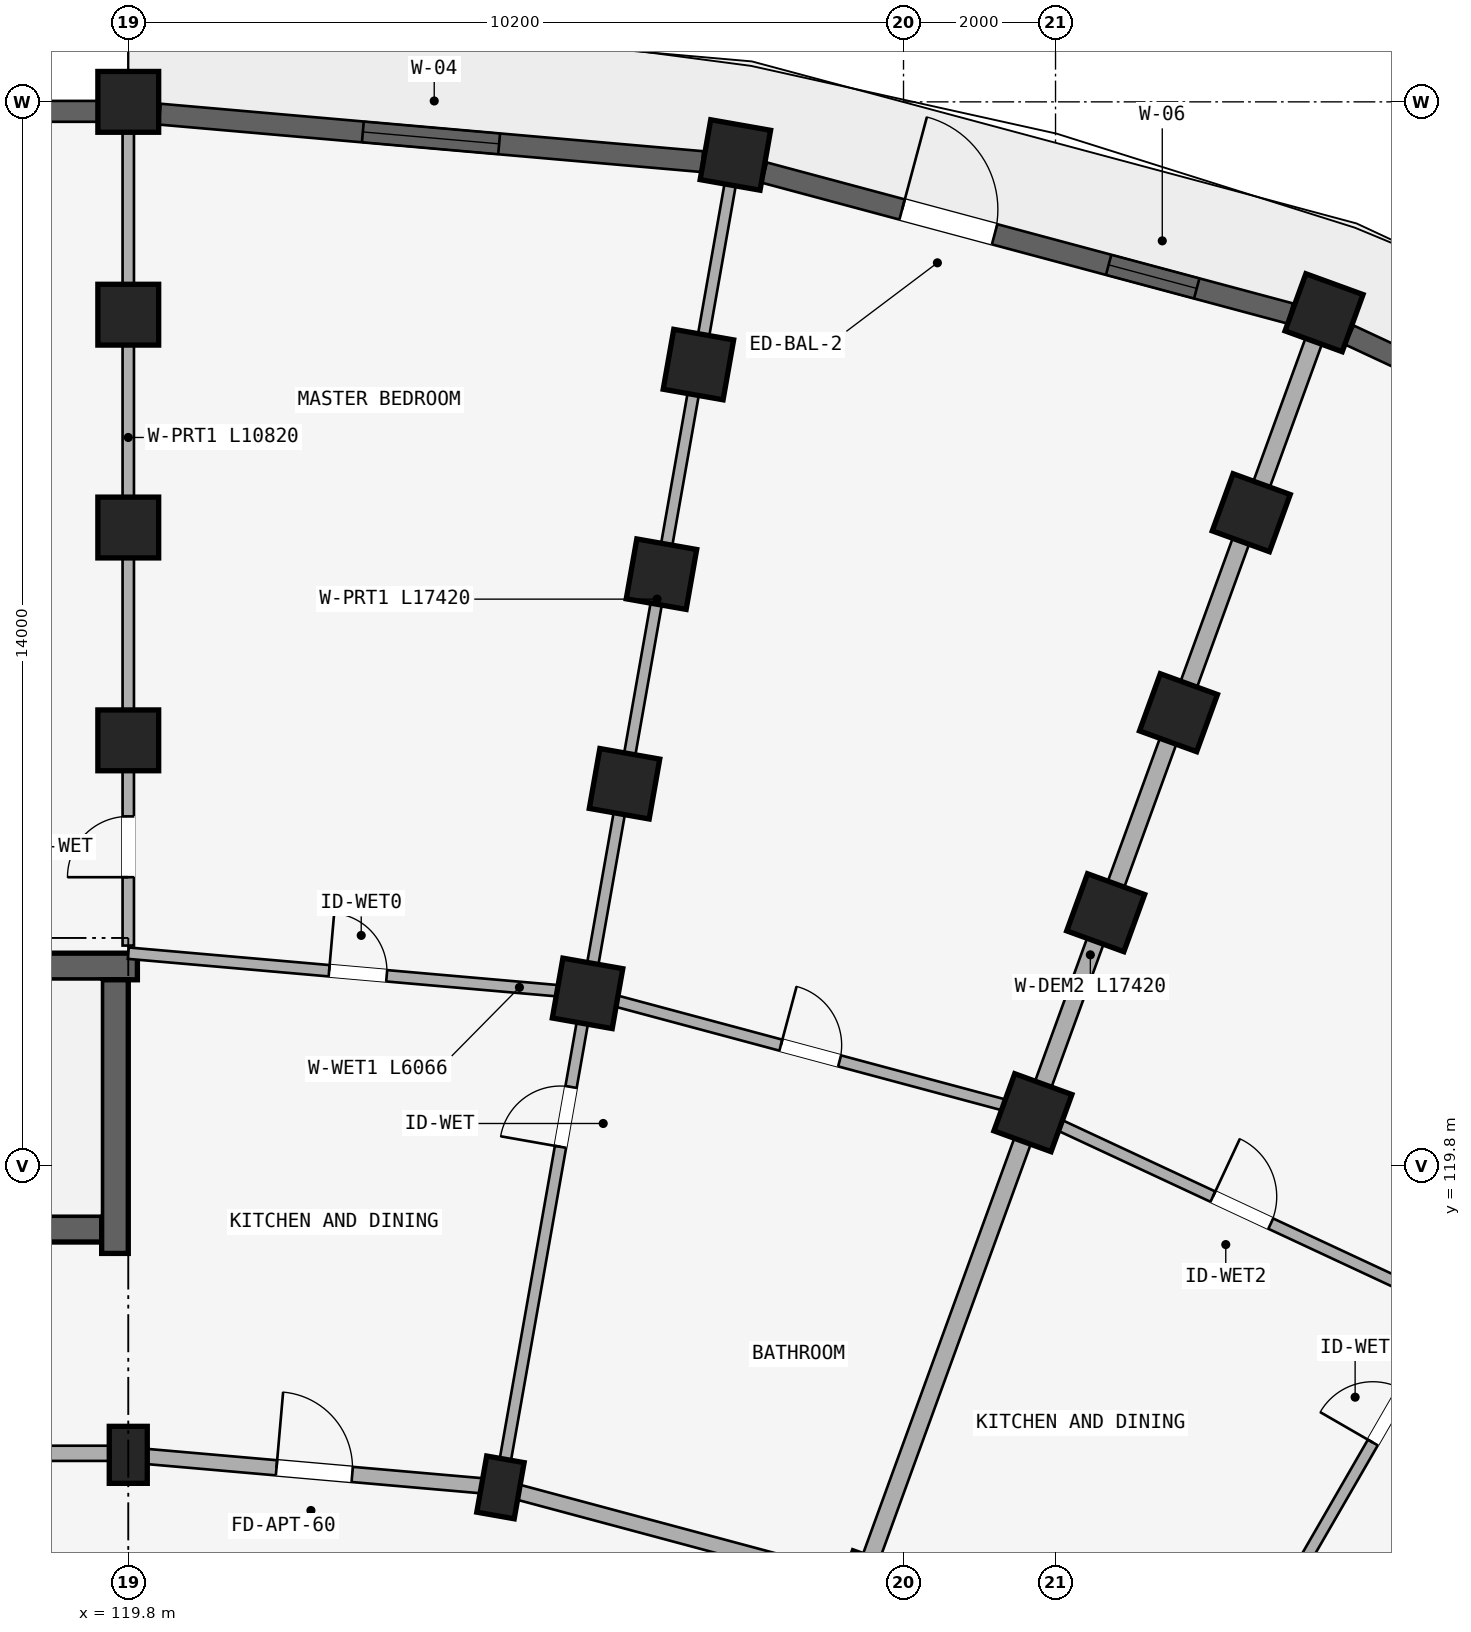
"""IFC4 building model, lengths in metres.
Left out: names, types, materials, properties, quantities, classifications, styles, units other than length and angle.
Written with IfcOpenShell. Run it as: python <this file> out.ifc"""

import sys

from ifc_helpers import new_model, si_unit, direction, frame, frame_2d, origin, origin_2d, place, context, subcontext, project, spatial, rectangle, extrude, element, fill, save


model = new_model("IFC4")
c1 = context("Model", 3, precision=1e-05, world=origin(), true_north=direction((0.0, 1.0)))
c2 = subcontext(c1, "Body", "Model", "MODEL_VIEW")
j1 = project(units=[si_unit("LENGTHUNIT", "METRE"), si_unit("PLANEANGLEUNIT", "RADIAN")], contexts=[c1])
p1 = place(None, origin())
s1 = spatial("IfcSite", under=j1, at=p1, CompositionType="ELEMENT")
p2 = place(p1, origin())
s2 = spatial("IfcBuilding", under=s1, at=p2, CompositionType="ELEMENT")
p3 = place(p2, frame((0.0, 0.0, 8.7)))
s3 = spatial("IfcBuildingStorey", under=s2, at=p3, CompositionType="ELEMENT", Elevation=8.7)
p4 = place(p3, frame((119.92, 122.425, 0.0), z_axis=(0.0, 0.0, 1.0), x_axis=(-1.0, 0.0, 0.0)))
e1 = element("IfcWall", 1, at=p4, inside=s3, PredefinedType="SHEAR", context=c2, shape_type="SweptSolid", body=[
    extrude(rectangle(XDim=8.545, YDim=0.35, at=frame_2d((4.272, 0.0))), origin(), (0.0, 0.0, 1.0), 2.93),
])
p5 = place(p3, frame((119.45, 118.975, 0.0), z_axis=(0.0, 0.0, 1.0), x_axis=(-1.0, 0.0, 0.0)))
e2 = element("IfcWall", 2, at=p5, inside=s3, PredefinedType="SHEAR", context=c2, shape_type="SweptSolid", body=[
    extrude(rectangle(XDim=8.075, YDim=0.35, at=frame_2d((4.038, 0.0))), origin(), (0.0, 0.0, 1.0), 2.93),
])
p6 = place(p5, frame((6.38, 0.0, 0.0)))
e3 = element("IfcOpeningElement", 3, at=p6, cuts=e2, PredefinedType="OPENING", context=c2, shape_type="SweptSolid", body=[
    extrude(rectangle(XDim=1.24, YDim=2.15, at=frame_2d((0.62, 1.075))), frame((0.0, 0.185, 0.0), z_axis=(0.0, -1.0, 0.0), x_axis=(1.0, 0.0, 0.0)), (0.0, 0.0, 1.0), 0.37),
])
p7 = place(p3, frame((119.625, 118.65, 0.0), z_axis=(0.0, 0.0, 1.0), x_axis=(0.0, 1.0, 0.0)))
e4 = element("IfcWall", 4, at=p7, inside=s3, PredefinedType="SHEAR", context=c2, shape_type="SweptSolid", body=[
    extrude(rectangle(XDim=3.6, YDim=0.35, at=frame_2d((1.8, 0.0))), origin(), (0.0, 0.0, 1.0), 2.93),
])
p8 = place(p3, frame((119.8, 116.0, 0.0), z_axis=(0.0, 0.0, 1.0), x_axis=(1.0, 0.0, 0.0)))
e5 = element("IfcColumn", 5, at=p8, inside=s3, PredefinedType="COLUMN", context=c2, shape_type="SweptSolid", body=[
    extrude(rectangle(XDim=0.5, YDim=0.75, at=origin_2d()), origin(), (0.0, 0.0, 1.0), 2.93),
])
for number, where, z_axis, x_axis in (
    (6, (119.8, 125.4, 0.0), (0.0, 0.0, 1.0), (1.0, 0.0, 0.0)),
    (7, (119.8, 128.2, 0.0), (0.0, 0.0, 1.0), (1.0, 0.0, 0.0)),
    (8, (119.8, 131.0, 0.0), (0.0, 0.0, 1.0), (1.0, 0.0, 0.0)),
    (9, (119.8, 133.8, 0.0), (0.0, 0.0, 1.0), (1.0, 0.0, 0.0)),
):
    element("IfcColumn", number, at=place(p3, frame(where, z_axis=z_axis, x_axis=x_axis)), inside=s3, PredefinedType="COLUMN", context=c2, shape_type="SweptSolid", body=[
        extrude(rectangle(XDim=0.8, YDim=0.8, at=origin_2d()), origin(), (0.0, 0.0, 1.0), 2.93),
    ])
p9 = place(p3, frame((124.697, 115.572, 0.0), z_axis=(0.0, 0.0, 1.0), x_axis=(-0.984807753012, 0.173648177667, 0.0)))
e10 = element("IfcColumn", 10, at=p9, inside=s3, PredefinedType="COLUMN", context=c2, shape_type="SweptSolid", body=[
    extrude(rectangle(XDim=0.5, YDim=0.75, at=origin_2d()), origin(), (0.0, 0.0, 1.0), 2.93),
])
for number, where, z_axis, x_axis in (
    (11, (125.843, 122.071, 0.0), (0.0, 0.0, 1.0), (-0.985, 0.174, 0.0)),
    (12, (126.329, 124.829, 0.0), (0.0, 0.0, 1.0), (-0.985, 0.174, 0.0)),
    (13, (126.815, 127.586, 0.0), (0.0, 0.0, 1.0), (-0.985, 0.174, 0.0)),
    (14, (127.302, 130.344, 0.0), (0.0, 0.0, 1.0), (-0.985, 0.174, 0.0)),
    (15, (127.788, 133.101, 0.0), (0.0, 0.0, 1.0), (-0.985, 0.174, 0.0)),
):
    element("IfcColumn", number, at=place(p3, frame(where, z_axis=z_axis, x_axis=x_axis)), inside=s3, PredefinedType="COLUMN", context=c2, shape_type="SweptSolid", body=[
        extrude(rectangle(XDim=0.8, YDim=0.8, at=origin_2d()), origin(), (0.0, 0.0, 1.0), 2.93),
    ])
p10 = place(p3, frame((129.445, 114.299, 0.0), z_axis=(0.0, 0.0, 1.0), x_axis=(-0.939692620786, 0.342020143326, 0.0)))
e16 = element("IfcColumn", 16, at=p10, inside=s3, PredefinedType="COLUMN", context=c2, shape_type="SweptSolid", body=[
    extrude(rectangle(XDim=0.5, YDim=0.75, at=origin_2d()), origin(), (0.0, 0.0, 1.0), 2.93),
])
for number, where, z_axis, x_axis in (
    (17, (131.702, 120.501, 0.0), (0.0, 0.0, 1.0), (-0.94, 0.342, 0.0)),
    (18, (132.66, 123.132, 0.0), (0.0, 0.0, 1.0), (-0.94, 0.342, 0.0)),
    (19, (133.618, 125.764, 0.0), (0.0, 0.0, 1.0), (-0.94, 0.342, 0.0)),
    (20, (134.575, 128.395, 0.0), (0.0, 0.0, 1.0), (-0.94, 0.342, 0.0)),
    (21, (135.533, 131.026, 0.0), (0.0, 0.0, 1.0), (-0.94, 0.342, 0.0)),
):
    element("IfcColumn", number, at=place(p3, frame(where, z_axis=z_axis, x_axis=x_axis)), inside=s3, PredefinedType="COLUMN", context=c2, shape_type="SweptSolid", body=[
        extrude(rectangle(XDim=0.8, YDim=0.8, at=origin_2d()), origin(), (0.0, 0.0, 1.0), 2.93),
    ])
p11 = place(p3, frame((119.55, 116.02, 0.0), z_axis=(0.0, 0.0, 1.0), x_axis=(-1.0, 0.0, 0.0)))
e22 = element("IfcWall", 22, at=p11, inside=s3, PredefinedType="STANDARD", context=c2, shape_type="SweptSolid", body=[
    extrude(rectangle(XDim=5.25, YDim=0.2, at=frame_2d((2.625, 0.0))), origin(), (0.0, 0.0, 1.0), 2.372),
])
p12 = place(p11, frame((2.165, 0.0, 0.0)))
e23 = element("IfcOpeningElement", 23, at=p12, cuts=e22, PredefinedType="OPENING", context=c2, shape_type="SweptSolid", body=[
    extrude(rectangle(XDim=0.92, YDim=2.1, at=frame_2d((0.46, 1.05))), frame((0.0, 0.11, 0.0), z_axis=(0.0, -1.0, 0.0), x_axis=(1.0, 0.0, 0.0)), (0.0, 0.0, 1.0), 0.22),
])
p13 = place(p3, frame((119.8, 116.0, 0.0), z_axis=(0.0, 0.0, 1.0), x_axis=(0.996193663584, -0.087167566415, 0.0)))
e24 = element("IfcWall", 24, at=p13, inside=s3, PredefinedType="STANDARD", context=c2, shape_type="SweptSolid", body=[
    extrude(rectangle(XDim=4.916, YDim=0.2, at=frame_2d((2.458, 0.0))), origin(), (0.0, 0.0, 1.0), 2.372),
])
p14 = place(p13, frame((1.958, 0.0, 0.0)))
e25 = element("IfcOpeningElement", 25, at=p14, cuts=e24, PredefinedType="OPENING", context=c2, shape_type="SweptSolid", body=[
    extrude(rectangle(XDim=1.0, YDim=2.15, at=frame_2d((0.5, 1.075))), frame((0.0, 0.11, 0.0), z_axis=(0.0, -1.0, 0.0), x_axis=(1.0, 0.0, 0.0)), (0.0, 0.0, 1.0), 0.22),
])
p15 = place(p3, frame((124.697, 115.572, 0.0), z_axis=(0.0, 0.0, 1.0), x_axis=(0.965930095386, -0.258803112091, 0.0)))
e26 = element("IfcWall", 26, at=p15, inside=s3, PredefinedType="STANDARD", context=c2, shape_type="SweptSolid", body=[
    extrude(rectangle(XDim=4.916, YDim=0.2, at=frame_2d((2.458, 0.0))), origin(), (0.0, 0.0, 1.0), 2.372),
])
p16 = place(p3, frame((119.8, 122.7, 0.0), z_axis=(0.0, 0.0, 1.0), x_axis=(0.0, 1.0, 0.0)))
e27 = element("IfcWall", 27, at=p16, inside=s3, PredefinedType="PARTITIONING", context=c2, shape_type="SweptSolid", body=[
    extrude(rectangle(XDim=10.82, YDim=0.15, at=frame_2d((5.41, 0.0))), origin(), (0.0, 0.0, 1.0), 2.372),
])
p17 = place(p16, frame((0.899, 0.0, 0.0)))
e28 = element("IfcOpeningElement", 28, at=p17, cuts=e27, PredefinedType="OPENING", context=c2, shape_type="SweptSolid", body=[
    extrude(rectangle(XDim=0.8, YDim=2.1, at=frame_2d((0.4, 1.05))), frame((0.0, 0.085, 0.0), z_axis=(0.0, -1.0, 0.0), x_axis=(1.0, 0.0, 0.0)), (0.0, 0.0, 1.0), 0.17),
])
p18 = place(p3, frame((124.714, 115.67, 0.0), z_axis=(0.0, 0.0, 1.0), x_axis=(0.173646216546, 0.984808098809, 0.0)))
e29 = element("IfcWall", 29, at=p18, inside=s3, PredefinedType="PARTITIONING", context=c2, shape_type="SweptSolid", body=[
    extrude(rectangle(XDim=17.42, YDim=0.15, at=frame_2d((8.71, 0.0))), origin(), (0.0, 0.0, 1.0), 2.372),
])
p19 = place(p18, frame((4.45, 0.0, 0.0)))
e30 = element("IfcOpeningElement", 30, at=p19, cuts=e29, PredefinedType="OPENING", context=c2, shape_type="SweptSolid", body=[
    extrude(rectangle(XDim=0.8, YDim=2.1, at=frame_2d((0.4, 1.05))), frame((0.0, 0.085, 0.0), z_axis=(0.0, -1.0, 0.0), x_axis=(1.0, 0.0, 0.0)), (0.0, 0.0, 1.0), 0.17),
])
p20 = place(p3, frame((129.479, 114.393, 0.0), z_axis=(0.0, 0.0, 1.0), x_axis=(0.342022120477, 0.939691901159, 0.0)))
e31 = element("IfcWall", 31, at=p20, inside=s3, PredefinedType="STANDARD", context=c2, shape_type="SweptSolid", body=[
    extrude(rectangle(XDim=17.42, YDim=0.23, at=frame_2d((8.71, 0.0))), origin(), (0.0, 0.0, 1.0), 2.372),
])
p21 = place(p3, frame((133.95, 112.309, 0.0), z_axis=(0.0, 0.0, 1.0), x_axis=(0.499997843263, 0.866026648973, 0.0)))
e32 = element("IfcWall", 32, at=p21, inside=s3, PredefinedType="PARTITIONING", context=c2, shape_type="SweptSolid", body=[
    extrude(rectangle(XDim=17.42, YDim=0.15, at=frame_2d((8.71, 0.0))), origin(), (0.0, 0.0, 1.0), 2.372),
])
p22 = place(p21, frame((4.45, 0.0, 0.0)))
e33 = element("IfcOpeningElement", 33, at=p22, cuts=e32, PredefinedType="OPENING", context=c2, shape_type="SweptSolid", body=[
    extrude(rectangle(XDim=0.8, YDim=2.1, at=frame_2d((0.4, 1.05))), frame((0.0, 0.085, 0.0), z_axis=(0.0, -1.0, 0.0), x_axis=(1.0, 0.0, 0.0)), (0.0, 0.0, 1.0), 0.17),
])
p23 = place(p3, frame((119.8, 122.6, 0.0), z_axis=(0.0, 0.0, 1.0), x_axis=(0.996193018494, -0.087174938512, 0.0)))
e34 = element("IfcWall", 34, at=p23, inside=s3, PredefinedType="PLUMBINGWALL", context=c2, shape_type="SweptSolid", body=[
    extrude(rectangle(XDim=6.066, YDim=0.15, at=frame_2d((3.033, 0.0))), origin(), (0.0, 0.0, 1.0), 2.372),
])
p24 = place(p23, frame((2.653, 0.0, 0.0)))
e35 = element("IfcOpeningElement", 35, at=p24, cuts=e34, PredefinedType="OPENING", context=c2, shape_type="SweptSolid", body=[
    extrude(rectangle(XDim=0.76, YDim=2.05, at=frame_2d((0.38, 1.025))), frame((0.0, 0.085, 0.0), z_axis=(0.0, -1.0, 0.0), x_axis=(1.0, 0.0, 0.0)), (0.0, 0.0, 1.0), 0.17),
])
p25 = place(p3, frame((125.843, 122.071, 0.0), z_axis=(0.0, 0.0, 1.0), x_axis=(0.965923618901, -0.258827283048, 0.0)))
e36 = element("IfcWall", 36, at=p25, inside=s3, PredefinedType="PLUMBINGWALL", context=c2, shape_type="SweptSolid", body=[
    extrude(rectangle(XDim=6.066, YDim=0.15, at=frame_2d((3.033, 0.0))), origin(), (0.0, 0.0, 1.0), 2.372),
])
p26 = place(p25, frame((2.633, 0.0, 0.0)))
e37 = element("IfcOpeningElement", 37, at=p26, cuts=e36, PredefinedType="OPENING", context=c2, shape_type="SweptSolid", body=[
    extrude(rectangle(XDim=0.8, YDim=2.1, at=frame_2d((0.4, 1.05))), frame((0.0, 0.085, 0.0), z_axis=(0.0, -1.0, 0.0), x_axis=(1.0, 0.0, 0.0)), (0.0, 0.0, 1.0), 0.17),
])
p27 = place(p3, frame((131.702, 120.501, 0.0), z_axis=(0.0, 0.0, 1.0), x_axis=(0.906312656069, -0.42260781991, 0.0)))
e38 = element("IfcWall", 38, at=p27, inside=s3, PredefinedType="PLUMBINGWALL", context=c2, shape_type="SweptSolid", body=[
    extrude(rectangle(XDim=6.066, YDim=0.15, at=frame_2d((3.033, 0.0))), origin(), (0.0, 0.0, 1.0), 2.372),
])
p28 = place(p27, frame((2.613, 0.0, 0.0)))
e39 = element("IfcOpeningElement", 39, at=p28, cuts=e38, PredefinedType="OPENING", context=c2, shape_type="SweptSolid", body=[
    extrude(rectangle(XDim=0.84, YDim=2.1, at=frame_2d((0.42, 1.05))), frame((0.0, 0.085, 0.0), z_axis=(0.0, -1.0, 0.0), x_axis=(1.0, 0.0, 0.0)), (0.0, 0.0, 1.0), 0.17),
])
p29 = place(p3, frame((120.215, 133.638, 0.0), z_axis=(0.0, 0.0, 1.0), x_axis=(0.99619608453, -0.08713989423, 0.0)))
e40 = element("IfcWall", 40, at=p29, inside=s3, PredefinedType="STANDARD", context=c2, shape_type="SweptSolid", body=[
    extrude(rectangle(XDim=7.164, YDim=0.275, at=frame_2d((3.582, 0.0))), origin(), (0.0, 0.0, 1.0), 2.472),
])
p30 = place(p29, frame((2.682, 0.0, 0.622)))
e41 = element("IfcOpeningElement", 41, at=p30, cuts=e40, PredefinedType="OPENING", context=c2, shape_type="SweptSolid", body=[
    extrude(rectangle(XDim=1.8, YDim=1.65, at=frame_2d((0.9, 0.825))), frame((0.0, 0.147, 0.0), z_axis=(0.0, -1.0, 0.0), x_axis=(1.0, 0.0, 0.0)), (0.0, 0.0, 1.0), 0.295),
])
p31 = place(p3, frame((128.168, 132.87, 0.0), z_axis=(0.0, 0.0, 1.0), x_axis=(0.965923712619, -0.258826933296, 0.0)))
e42 = element("IfcWall", 42, at=p31, inside=s3, PredefinedType="STANDARD", context=c2, shape_type="SweptSolid", body=[
    extrude(rectangle(XDim=7.164, YDim=0.275, at=frame_2d((3.582, 0.0))), origin(), (0.0, 0.0, 1.0), 2.472),
])
p32 = place(p31, frame((4.69, 0.0, 0.522)))
e43 = element("IfcOpeningElement", 43, at=p32, cuts=e42, PredefinedType="OPENING", context=c2, shape_type="SweptSolid", body=[
    extrude(rectangle(XDim=1.2, YDim=1.5, at=frame_2d((0.6, 0.75))), frame((0.0, 0.147, 0.0), z_axis=(0.0, -1.0, 0.0), x_axis=(1.0, 0.0, 0.0)), (0.0, 0.0, 1.0), 0.295),
])
p33 = place(p31, frame((1.877, 0.0, 0.0)))
e44 = element("IfcOpeningElement", 44, at=p33, cuts=e42, PredefinedType="OPENING", context=c2, shape_type="SweptSolid", body=[
    extrude(rectangle(XDim=1.26, YDim=2.15, at=frame_2d((0.63, 1.075))), frame((0.0, 0.147, 0.0), z_axis=(0.0, -1.0, 0.0), x_axis=(1.0, 0.0, 0.0)), (0.0, 0.0, 1.0), 0.295),
])
p34 = place(p3, frame((135.867, 130.732, 0.0), z_axis=(0.0, 0.0, 1.0), x_axis=(0.906300636296, -0.422633596215, 0.0)))
e45 = element("IfcWall", 45, at=p34, inside=s3, PredefinedType="STANDARD", context=c2, shape_type="SweptSolid", body=[
    extrude(rectangle(XDim=7.164, YDim=0.275, at=frame_2d((3.582, 0.0))), origin(), (0.0, 0.0, 1.0), 2.472),
])
p35 = place(p34, frame((2.457, 0.0, 0.322)))
e46 = element("IfcOpeningElement", 46, at=p35, cuts=e45, PredefinedType="OPENING", context=c2, shape_type="SweptSolid", body=[
    extrude(rectangle(XDim=2.25, YDim=1.95, at=frame_2d((1.125, 0.975))), frame((0.0, 0.147, 0.0), z_axis=(0.0, -1.0, 0.0), x_axis=(1.0, 0.0, 0.0)), (0.0, 0.0, 1.0), 0.295),
])
p36 = place(p3, frame((119.396, 133.675, 0.0), z_axis=(0.0, 0.0, 1.0), x_axis=(-1.0, 0.0, 0.0)))
e47 = element("IfcWall", 47, at=p36, inside=s3, PredefinedType="STANDARD", context=c2, shape_type="SweptSolid", body=[
    extrude(rectangle(XDim=4.793, YDim=0.275, at=frame_2d((2.396, 0.0))), origin(), (0.0, 0.0, 1.0), 2.472),
])
p37 = place(p36, frame((1.921, 0.0, 0.88)))
e48 = element("IfcOpeningElement", 48, at=p37, cuts=e47, PredefinedType="OPENING", context=c2, shape_type="SweptSolid", body=[
    extrude(rectangle(XDim=0.95, YDim=1.35, at=frame_2d((0.475, 0.675))), frame((0.0, 0.147, 0.0), z_axis=(0.0, -1.0, 0.0), x_axis=(1.0, 0.0, 0.0)), (0.0, 0.0, 1.0), 0.295),
])
p38 = place(p30, origin())
e49 = element("IfcWindow", 49, at=p38, inside=s3, PartitioningType="DOUBLE_PANEL_VERTICAL", PredefinedType="WINDOW", context=c2, shape_type="SweptSolid", body=[
    extrude(rectangle(XDim=1.8, YDim=1.65, at=frame_2d((0.9, 0.825))), frame((0.0, 0.03, 0.0), z_axis=(0.0, -1.0, 0.0), x_axis=(1.0, 0.0, 0.0)), (0.0, 0.0, 1.0), 0.06),
])
fill(e41, e49)
p39 = place(p32, origin())
e50 = element("IfcWindow", 50, at=p39, inside=s3, PartitioningType="SINGLE_PANEL", PredefinedType="WINDOW", context=c2, shape_type="SweptSolid", body=[
    extrude(rectangle(XDim=1.2, YDim=1.5, at=frame_2d((0.6, 0.75))), frame((0.0, 0.03, 0.0), z_axis=(0.0, -1.0, 0.0), x_axis=(1.0, 0.0, 0.0)), (0.0, 0.0, 1.0), 0.06),
])
fill(e43, e50)
p40 = place(p17, frame((0.8, 0.0, 0.0), z_axis=(0.0, 0.0, 1.0), x_axis=(-1.0, 0.0, 0.0)))
e51 = element("IfcDoor", 51, at=p40, inside=s3, OperationType="SINGLE_SWING_RIGHT", PredefinedType="DOOR", context=c2, shape_type="SweptSolid", body=[
    extrude(rectangle(XDim=0.8, YDim=2.1, at=frame_2d((0.4, 1.05))), frame((0.0, 0.025, 0.0), z_axis=(0.0, -1.0, 0.0), x_axis=(1.0, 0.0, 0.0)), (0.0, 0.0, 1.0), 0.05),
])
fill(e28, e51)
p41 = place(p19, origin())
e52 = element("IfcDoor", 52, at=p41, inside=s3, OperationType="SINGLE_SWING_LEFT", PredefinedType="DOOR", context=c2, shape_type="SweptSolid", body=[
    extrude(rectangle(XDim=0.8, YDim=2.1, at=frame_2d((0.4, 1.05))), frame((0.0, 0.025, 0.0), z_axis=(0.0, -1.0, 0.0), x_axis=(1.0, 0.0, 0.0)), (0.0, 0.0, 1.0), 0.05),
])
fill(e30, e52)
p42 = place(p22, frame((0.8, 0.0, 0.0), z_axis=(0.0, 0.0, 1.0), x_axis=(-1.0, 0.0, 0.0)))
e53 = element("IfcDoor", 53, at=p42, inside=s3, OperationType="SINGLE_SWING_RIGHT", PredefinedType="DOOR", context=c2, shape_type="SweptSolid", body=[
    extrude(rectangle(XDim=0.8, YDim=2.1, at=frame_2d((0.4, 1.05))), frame((0.0, 0.025, 0.0), z_axis=(0.0, -1.0, 0.0), x_axis=(1.0, 0.0, 0.0)), (0.0, 0.0, 1.0), 0.05),
])
fill(e33, e53)
p43 = place(p14, origin())
e54 = element("IfcDoor", 54, at=p43, inside=s3, OperationType="SINGLE_SWING_LEFT", PredefinedType="DOOR", context=c2, shape_type="SweptSolid", body=[
    extrude(rectangle(XDim=1.0, YDim=2.15, at=frame_2d((0.5, 1.075))), frame((0.0, 0.025, 0.0), z_axis=(0.0, -1.0, 0.0), x_axis=(1.0, 0.0, 0.0)), (0.0, 0.0, 1.0), 0.05),
])
fill(e25, e54)
p44 = place(p24, frame((0.76, 0.0, 0.0), z_axis=(0.0, 0.0, 1.0), x_axis=(-1.0, 0.0, 0.0)))
e55 = element("IfcDoor", 55, at=p44, inside=s3, OperationType="SINGLE_SWING_RIGHT", PredefinedType="DOOR", context=c2, shape_type="SweptSolid", body=[
    extrude(rectangle(XDim=0.76, YDim=2.05, at=frame_2d((0.38, 1.025))), frame((0.0, 0.025, 0.0), z_axis=(0.0, -1.0, 0.0), x_axis=(1.0, 0.0, 0.0)), (0.0, 0.0, 1.0), 0.05),
])
fill(e35, e55)
p45 = place(p26, origin())
e56 = element("IfcDoor", 56, at=p45, inside=s3, OperationType="SINGLE_SWING_LEFT", PredefinedType="DOOR", context=c2, shape_type="SweptSolid", body=[
    extrude(rectangle(XDim=0.8, YDim=2.1, at=frame_2d((0.4, 1.05))), frame((0.0, 0.025, 0.0), z_axis=(0.0, -1.0, 0.0), x_axis=(1.0, 0.0, 0.0)), (0.0, 0.0, 1.0), 0.05),
])
fill(e37, e56)
p46 = place(p28, origin())
e57 = element("IfcDoor", 57, at=p46, inside=s3, OperationType="SINGLE_SWING_LEFT", PredefinedType="DOOR", context=c2, shape_type="SweptSolid", body=[
    extrude(rectangle(XDim=0.84, YDim=2.1, at=frame_2d((0.42, 1.05))), frame((0.0, 0.025, 0.0), z_axis=(0.0, -1.0, 0.0), x_axis=(1.0, 0.0, 0.0)), (0.0, 0.0, 1.0), 0.05),
])
fill(e39, e57)
p47 = place(p33, origin())
e58 = element("IfcDoor", 58, at=p47, inside=s3, OperationType="SINGLE_SWING_LEFT", PredefinedType="DOOR", context=c2, shape_type="SweptSolid", body=[
    extrude(rectangle(XDim=1.26, YDim=2.15, at=frame_2d((0.63, 1.075))), frame((0.0, 0.025, 0.0), z_axis=(0.0, -1.0, 0.0), x_axis=(1.0, 0.0, 0.0)), (0.0, 0.0, 1.0), 0.05),
])
fill(e44, e58)
save(model, sys.argv[1])
